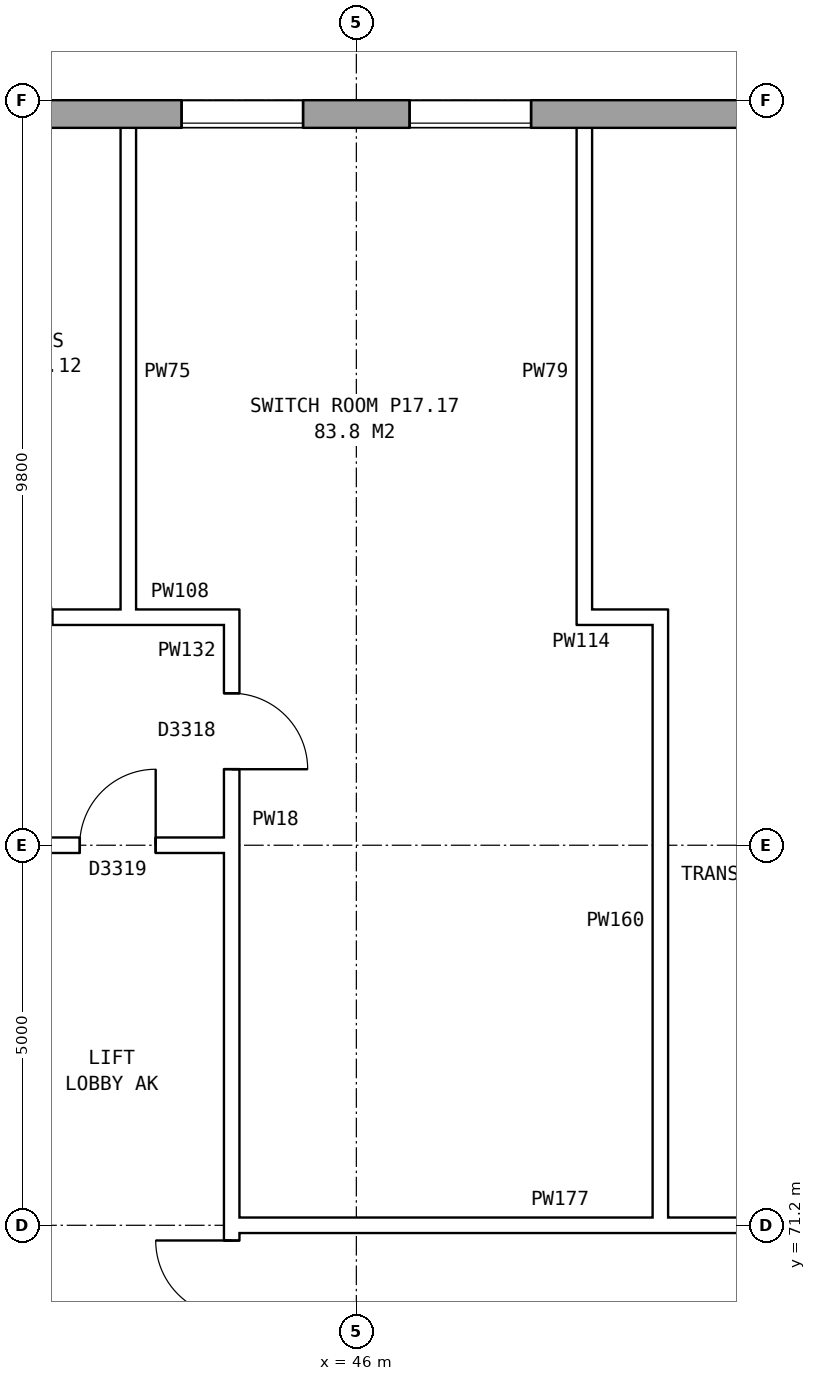
"""IFC4 building model, lengths in metres.
Left out: names, types, materials, properties, quantities, classifications, styles, units other than length and angle.
Written with IfcOpenShell. Run it as: python <this file> out.ifc"""

import sys

from ifc_helpers import new_model, si_unit, direction, frame, frame_2d, origin, place, context, subcontext, project, spatial, rectangle, extrude, element, fill, save


model = new_model("IFC4")
c1 = context("Model", 3, precision=1e-05, world=origin(), true_north=direction((0.0, 1.0)))
c2 = subcontext(c1, "Body", "Model", "MODEL_VIEW")
j1 = project(units=[si_unit("LENGTHUNIT", "METRE"), si_unit("PLANEANGLEUNIT", "RADIAN")], contexts=[c1])
p1 = place(None, origin())
s1 = spatial("IfcSite", under=j1, at=p1, CompositionType="ELEMENT")
p2 = place(p1, origin())
s2 = spatial("IfcBuilding", under=s1, at=p2, CompositionType="ELEMENT")
p3 = place(p2, frame((0.0, 0.0, 62.9)))
s3 = spatial("IfcBuildingStorey", under=s2, at=p3, CompositionType="ELEMENT", Elevation=62.9)
p4 = place(p3, frame((72.925, 85.82, 0.0), z_axis=(0.0, 0.0, 1.0), x_axis=(-1.0, 0.0, 0.0)))
e1 = element("IfcWall", 1, at=p4, inside=s3, PredefinedType="STANDARD", context=c2, shape_type="SweptSolid", body=[
    extrude(rectangle(XDim=46.601, YDim=0.36, at=frame_2d((23.3, 0.0))), origin(), (0.0, 0.0, 1.0), 4.2),
])
p5 = place(p4, frame((1.15, 0.0, 1.5)))
e2 = element("IfcOpeningElement", 2, at=p5, cuts=e1, PredefinedType="OPENING", context=c2, shape_type="SweptSolid", body=[
    extrude(rectangle(XDim=1.2, YDim=1.2, at=frame_2d((0.6, 0.6))), frame((0.0, 0.19, 0.0), z_axis=(0.0, -1.0, 0.0), x_axis=(1.0, 0.0, 0.0)), (0.0, 0.0, 1.0), 0.38),
])
p6 = place(p4, frame((3.625, 0.0, 1.5)))
e3 = element("IfcOpeningElement", 3, at=p6, cuts=e1, PredefinedType="OPENING", context=c2, shape_type="SweptSolid", body=[
    extrude(rectangle(XDim=1.6, YDim=1.2, at=frame_2d((0.8, 0.6))), frame((0.0, 0.19, 0.0), z_axis=(0.0, -1.0, 0.0), x_axis=(1.0, 0.0, 0.0)), (0.0, 0.0, 1.0), 0.38),
])
p7 = place(p4, frame((9.125, 0.0, 1.5)))
e4 = element("IfcOpeningElement", 4, at=p7, cuts=e1, PredefinedType="OPENING", context=c2, shape_type="SweptSolid", body=[
    extrude(rectangle(XDim=1.2, YDim=1.2, at=frame_2d((0.6, 0.6))), frame((0.0, 0.19, 0.0), z_axis=(0.0, -1.0, 0.0), x_axis=(1.0, 0.0, 0.0)), (0.0, 0.0, 1.0), 0.38),
])
p8 = place(p4, frame((12.625, 0.0, 1.5)))
e5 = element("IfcOpeningElement", 5, at=p8, cuts=e1, PredefinedType="OPENING", context=c2, shape_type="SweptSolid", body=[
    extrude(rectangle(XDim=1.6, YDim=1.2, at=frame_2d((0.8, 0.6))), frame((0.0, 0.19, 0.0), z_axis=(0.0, -1.0, 0.0), x_axis=(1.0, 0.0, 0.0)), (0.0, 0.0, 1.0), 0.38),
])
p9 = place(p4, frame((15.625, 0.0, 1.5)))
e6 = element("IfcOpeningElement", 6, at=p9, cuts=e1, PredefinedType="OPENING", context=c2, shape_type="SweptSolid", body=[
    extrude(rectangle(XDim=1.6, YDim=1.2, at=frame_2d((0.8, 0.6))), frame((0.0, 0.19, 0.0), z_axis=(0.0, -1.0, 0.0), x_axis=(1.0, 0.0, 0.0)), (0.0, 0.0, 1.0), 0.38),
])
p10 = place(p4, frame((20.175, 0.0, 1.5)))
e7 = element("IfcOpeningElement", 7, at=p10, cuts=e1, PredefinedType="OPENING", context=c2, shape_type="SweptSolid", body=[
    extrude(rectangle(XDim=1.6, YDim=1.2, at=frame_2d((0.8, 0.6))), frame((0.0, 0.19, 0.0), z_axis=(0.0, -1.0, 0.0), x_axis=(1.0, 0.0, 0.0)), (0.0, 0.0, 1.0), 0.38),
])
p11 = place(p4, frame((24.625, 0.0, 1.5)))
e8 = element("IfcOpeningElement", 8, at=p11, cuts=e1, PredefinedType="OPENING", context=c2, shape_type="SweptSolid", body=[
    extrude(rectangle(XDim=1.6, YDim=1.2, at=frame_2d((0.8, 0.6))), frame((0.0, 0.19, 0.0), z_axis=(0.0, -1.0, 0.0), x_axis=(1.0, 0.0, 0.0)), (0.0, 0.0, 1.0), 0.38),
])
p12 = place(p4, frame((27.625, 0.0, 1.5)))
e9 = element("IfcOpeningElement", 9, at=p12, cuts=e1, PredefinedType="OPENING", context=c2, shape_type="SweptSolid", body=[
    extrude(rectangle(XDim=1.6, YDim=1.2, at=frame_2d((0.8, 0.6))), frame((0.0, 0.19, 0.0), z_axis=(0.0, -1.0, 0.0), x_axis=(1.0, 0.0, 0.0)), (0.0, 0.0, 1.0), 0.38),
])
p13 = place(p4, frame((32.025, 0.0, 1.5)))
e10 = element("IfcOpeningElement", 10, at=p13, cuts=e1, PredefinedType="OPENING", context=c2, shape_type="SweptSolid", body=[
    extrude(rectangle(XDim=0.6, YDim=1.2, at=frame_2d((0.3, 0.6))), frame((0.0, 0.19, 0.0), z_axis=(0.0, -1.0, 0.0), x_axis=(1.0, 0.0, 0.0)), (0.0, 0.0, 1.0), 0.38),
])
p14 = place(p4, frame((33.125, 0.0, 1.5)))
e11 = element("IfcOpeningElement", 11, at=p14, cuts=e1, PredefinedType="OPENING", context=c2, shape_type="SweptSolid", body=[
    extrude(rectangle(XDim=0.9, YDim=1.2, at=frame_2d((0.45, 0.6))), frame((0.0, 0.19, 0.0), z_axis=(0.0, -1.0, 0.0), x_axis=(1.0, 0.0, 0.0)), (0.0, 0.0, 1.0), 0.38),
])
p15 = place(p4, frame((36.625, 0.0, 1.5)))
e12 = element("IfcOpeningElement", 12, at=p15, cuts=e1, PredefinedType="OPENING", context=c2, shape_type="SweptSolid", body=[
    extrude(rectangle(XDim=1.6, YDim=1.2, at=frame_2d((0.8, 0.6))), frame((0.0, 0.19, 0.0), z_axis=(0.0, -1.0, 0.0), x_axis=(1.0, 0.0, 0.0)), (0.0, 0.0, 1.0), 0.38),
])
p16 = place(p4, frame((39.625, 0.0, 1.5)))
e13 = element("IfcOpeningElement", 13, at=p16, cuts=e1, PredefinedType="OPENING", context=c2, shape_type="SweptSolid", body=[
    extrude(rectangle(XDim=1.6, YDim=1.2, at=frame_2d((0.8, 0.6))), frame((0.0, 0.19, 0.0), z_axis=(0.0, -1.0, 0.0), x_axis=(1.0, 0.0, 0.0)), (0.0, 0.0, 1.0), 0.38),
])
p17 = place(p4, frame((43.925, 0.0, 1.5)))
e14 = element("IfcOpeningElement", 14, at=p17, cuts=e1, PredefinedType="OPENING", context=c2, shape_type="SweptSolid", body=[
    extrude(rectangle(XDim=0.6, YDim=1.2, at=frame_2d((0.3, 0.6))), frame((0.0, 0.19, 0.0), z_axis=(0.0, -1.0, 0.0), x_axis=(1.0, 0.0, 0.0)), (0.0, 0.0, 1.0), 0.38),
])
p18 = place(p3, frame((44.36, 63.9, 0.0), z_axis=(0.0, 0.0, 1.0), x_axis=(0.0, 1.0, 0.0)))
e15 = element("IfcWall", 15, at=p18, inside=s3, PredefinedType="PARTITIONING", context=c2, shape_type="SweptSolid", body=[
    extrude(rectangle(XDim=12.2, YDim=0.2, at=frame_2d((6.1, 0.0))), origin(), (0.0, 0.0, 1.0), 4.2),
])
p19 = place(p18, frame((5.1, 0.0, 0.0)))
e16 = element("IfcOpeningElement", 16, at=p19, cuts=e15, PredefinedType="OPENING", context=c2, shape_type="SweptSolid", body=[
    extrude(rectangle(XDim=2.0, YDim=2.1, at=frame_2d((1.0, 1.05))), frame((0.0, 0.11, 0.0), z_axis=(0.0, -1.0, 0.0), x_axis=(1.0, 0.0, 0.0)), (0.0, 0.0, 1.0), 0.22),
])
p20 = place(p3, frame((44.36, 71.2, 0.0), z_axis=(0.0, 0.0, 1.0), x_axis=(1.0, 0.0, 0.0)))
e17 = element("IfcWall", 17, at=p20, inside=s3, PredefinedType="PARTITIONING", context=c2, shape_type="SweptSolid", body=[
    extrude(rectangle(XDim=19.28, YDim=0.2, at=frame_2d((9.64, 0.0))), origin(), (0.0, 0.0, 1.0), 4.2),
])
p21 = place(p20, frame((8.64, 0.0, 0.0)))
e18 = element("IfcOpeningElement", 18, at=p21, cuts=e17, PredefinedType="OPENING", context=c2, shape_type="SweptSolid", body=[
    extrude(rectangle(XDim=1.0, YDim=2.1, at=frame_2d((0.5, 1.05))), frame((0.0, 0.11, 0.0), z_axis=(0.0, -1.0, 0.0), x_axis=(1.0, 0.0, 0.0)), (0.0, 0.0, 1.0), 0.22),
])
p22 = place(p20, frame((15.46, 0.0, 0.0)))
e19 = element("IfcOpeningElement", 19, at=p22, cuts=e17, PredefinedType="OPENING", context=c2, shape_type="SweptSolid", body=[
    extrude(rectangle(XDim=1.0, YDim=2.1, at=frame_2d((0.5, 1.05))), frame((0.0, 0.11, 0.0), z_axis=(0.0, -1.0, 0.0), x_axis=(1.0, 0.0, 0.0)), (0.0, 0.0, 1.0), 0.22),
])
p23 = place(p3, frame((41.36, 76.2, 0.0), z_axis=(0.0, 0.0, 1.0), x_axis=(1.0, 0.0, 0.0)))
e20 = element("IfcWall", 20, at=p23, inside=s3, PredefinedType="PARTITIONING", context=c2, shape_type="SweptSolid", body=[
    extrude(rectangle(XDim=3.1, YDim=0.2, at=frame_2d((1.55, 0.0))), origin(), (0.0, 0.0, 1.0), 4.2),
])
p24 = place(p23, frame((1.0, 0.0, 0.0)))
e21 = element("IfcOpeningElement", 21, at=p24, cuts=e20, PredefinedType="OPENING", context=c2, shape_type="SweptSolid", body=[
    extrude(rectangle(XDim=1.0, YDim=2.1, at=frame_2d((0.5, 1.05))), frame((0.0, 0.11, 0.0), z_axis=(0.0, -1.0, 0.0), x_axis=(1.0, 0.0, 0.0)), (0.0, 0.0, 1.0), 0.22),
])
p25 = place(p3, frame((42.9, 79.2, 0.0), z_axis=(0.0, 0.0, 1.0), x_axis=(1.0, 0.0, 0.0)))
e22 = element("IfcWall", 22, at=p25, inside=s3, PredefinedType="PARTITIONING", context=c2, shape_type="SweptSolid", body=[
    extrude(rectangle(XDim=1.56, YDim=0.2, at=frame_2d((0.78, 0.0))), origin(), (0.0, 0.0, 1.0), 4.2),
])
p26 = place(p3, frame((48.9, 79.2, 0.0), z_axis=(0.0, 0.0, 1.0), x_axis=(1.0, 0.0, 0.0)))
e23 = element("IfcWall", 23, at=p26, inside=s3, PredefinedType="PARTITIONING", context=c2, shape_type="SweptSolid", body=[
    extrude(rectangle(XDim=1.2, YDim=0.2, at=frame_2d((0.6, 0.0))), origin(), (0.0, 0.0, 1.0), 4.2),
])
p27 = place(p3, frame((39.9, 79.2, 0.0), z_axis=(0.0, 0.0, 1.0), x_axis=(1.0, 0.0, 0.0)))
e24 = element("IfcWall", 24, at=p27, inside=s3, PredefinedType="PARTITIONING", context=c2, shape_type="SweptSolid", body=[
    extrude(rectangle(XDim=3.2, YDim=0.2, at=frame_2d((1.6, 0.0))), origin(), (0.0, 0.0, 1.0), 4.2),
])
p28 = place(p27, frame((1.1, 0.0, 0.0)))
e25 = element("IfcOpeningElement", 25, at=p28, cuts=e24, PredefinedType="OPENING", context=c2, shape_type="SweptSolid", body=[
    extrude(rectangle(XDim=1.0, YDim=2.1, at=frame_2d((0.5, 1.05))), frame((0.0, 0.11, 0.0), z_axis=(0.0, -1.0, 0.0), x_axis=(1.0, 0.0, 0.0)), (0.0, 0.0, 1.0), 0.22),
])
p29 = place(p3, frame((43.0, 79.1, 0.0), z_axis=(0.0, 0.0, 1.0), x_axis=(0.0, 1.0, 0.0)))
e26 = element("IfcWall", 26, at=p29, inside=s3, PredefinedType="PARTITIONING", context=c2, shape_type="SweptSolid", body=[
    extrude(rectangle(XDim=6.66, YDim=0.2, at=frame_2d((3.33, 0.0))), origin(), (0.0, 0.0, 1.0), 4.2),
])
p30 = place(p3, frame((44.36, 76.1, 0.0), z_axis=(0.0, 0.0, 1.0), x_axis=(0.0, 1.0, 0.0)))
e27 = element("IfcWall", 27, at=p30, inside=s3, PredefinedType="PARTITIONING", context=c2, shape_type="SweptSolid", body=[
    extrude(rectangle(XDim=3.2, YDim=0.2, at=frame_2d((1.6, 0.0))), origin(), (0.0, 0.0, 1.0), 4.2),
])
p31 = place(p30, frame((1.1, 0.0, 0.0)))
e28 = element("IfcOpeningElement", 28, at=p31, cuts=e27, PredefinedType="OPENING", context=c2, shape_type="SweptSolid", body=[
    extrude(rectangle(XDim=1.0, YDim=2.1, at=frame_2d((0.5, 1.05))), frame((0.0, 0.11, 0.0), z_axis=(0.0, -1.0, 0.0), x_axis=(1.0, 0.0, 0.0)), (0.0, 0.0, 1.0), 0.22),
])
p32 = place(p3, frame((49.0, 79.1, 0.0), z_axis=(0.0, 0.0, 1.0), x_axis=(0.0, 1.0, 0.0)))
e29 = element("IfcWall", 29, at=p32, inside=s3, PredefinedType="PARTITIONING", context=c2, shape_type="SweptSolid", body=[
    extrude(rectangle(XDim=6.66, YDim=0.2, at=frame_2d((3.33, 0.0))), origin(), (0.0, 0.0, 1.0), 4.2),
])
p33 = place(p3, frame((50.0, 71.1, 0.0), z_axis=(0.0, 0.0, 1.0), x_axis=(0.0, 1.0, 0.0)))
e30 = element("IfcWall", 30, at=p33, inside=s3, PredefinedType="PARTITIONING", context=c2, shape_type="SweptSolid", body=[
    extrude(rectangle(XDim=8.2, YDim=0.2, at=frame_2d((4.1, 0.0))), origin(), (0.0, 0.0, 1.0), 4.2),
])
p34 = place(p11, origin())
e31 = element("IfcWindow", 31, at=p34, inside=s3, PartitioningType="DOUBLE_PANEL_HORIZONTAL", PredefinedType="WINDOW", context=c2, shape_type="SweptSolid", body=[
    extrude(rectangle(XDim=1.6, YDim=1.2, at=frame_2d((0.8, 0.6))), frame((0.0, 0.15, 0.0), z_axis=(0.0, -1.0, 0.0), x_axis=(1.0, 0.0, 0.0)), (0.0, 0.0, 1.0), 0.06),
])
fill(e8, e31)
p35 = place(p12, origin())
e32 = element("IfcWindow", 32, at=p35, inside=s3, PartitioningType="DOUBLE_PANEL_HORIZONTAL", PredefinedType="WINDOW", context=c2, shape_type="SweptSolid", body=[
    extrude(rectangle(XDim=1.6, YDim=1.2, at=frame_2d((0.8, 0.6))), frame((0.0, 0.15, 0.0), z_axis=(0.0, -1.0, 0.0), x_axis=(1.0, 0.0, 0.0)), (0.0, 0.0, 1.0), 0.06),
])
fill(e9, e32)
p36 = place(p19, origin())
e33 = element("IfcDoor", 33, at=p36, inside=s3, OperationType="DOUBLE_DOOR_SINGLE_SWING", PredefinedType="DOOR", context=c2, shape_type="SweptSolid", body=[
    extrude(rectangle(XDim=2.0, YDim=2.1, at=frame_2d((1.0, 1.05))), frame((0.0, 0.025, 0.0), z_axis=(0.0, -1.0, 0.0), x_axis=(1.0, 0.0, 0.0)), (0.0, 0.0, 1.0), 0.05),
])
fill(e16, e33)
p37 = place(p24, origin())
e34 = element("IfcDoor", 34, at=p37, inside=s3, OperationType="SINGLE_SWING_RIGHT", PredefinedType="DOOR", context=c2, shape_type="SweptSolid", body=[
    extrude(rectangle(XDim=1.0, YDim=2.1, at=frame_2d((0.5, 1.05))), frame((0.0, 0.025, 0.0), z_axis=(0.0, -1.0, 0.0), x_axis=(1.0, 0.0, 0.0)), (0.0, 0.0, 1.0), 0.05),
])
fill(e21, e34)
p38 = place(p31, frame((1.0, 0.0, 0.0), z_axis=(0.0, 0.0, 1.0), x_axis=(-1.0, 0.0, 0.0)))
e35 = element("IfcDoor", 35, at=p38, inside=s3, OperationType="SINGLE_SWING_RIGHT", PredefinedType="DOOR", context=c2, shape_type="SweptSolid", body=[
    extrude(rectangle(XDim=1.0, YDim=2.1, at=frame_2d((0.5, 1.05))), frame((0.0, 0.025, 0.0), z_axis=(0.0, -1.0, 0.0), x_axis=(1.0, 0.0, 0.0)), (0.0, 0.0, 1.0), 0.05),
])
fill(e28, e35)
save(model, sys.argv[1])
